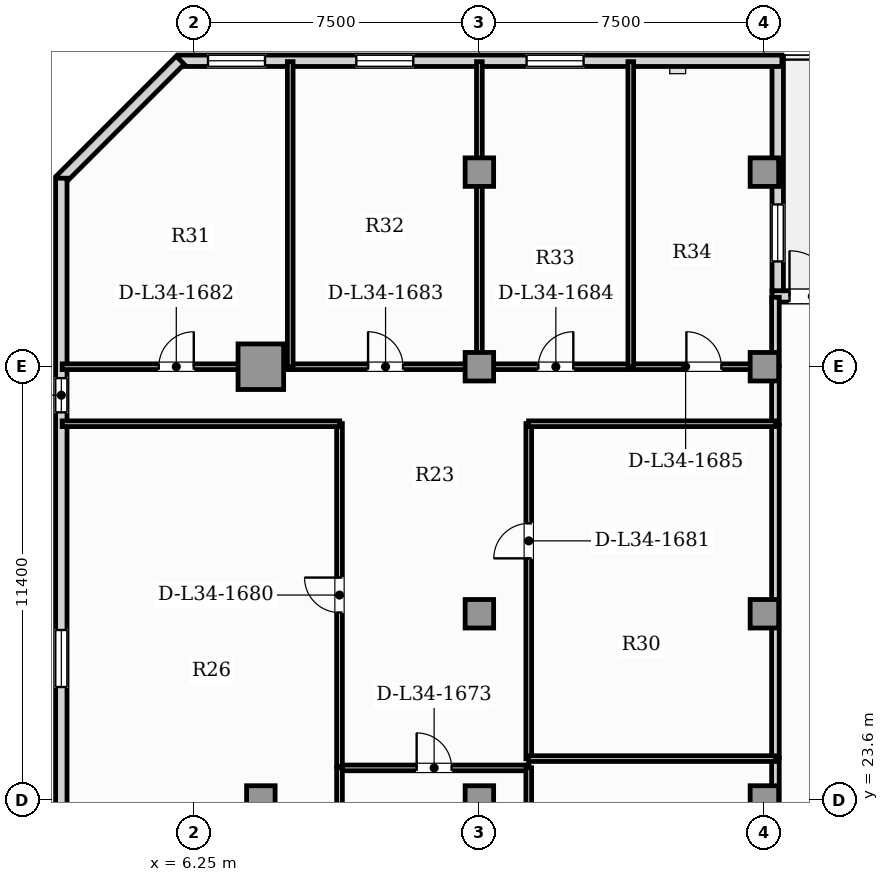
"""IFC4 building model, lengths in metres.
Left out: names, types, materials, properties, quantities, classifications, styles, units other than length and angle.
Written with IfcOpenShell. Run it as: python <this file> out.ifc"""

import sys

from ifc_helpers import new_model, si_unit, direction, frame, frame_2d, origin, origin_2d, place, context, subcontext, project, spatial, rectangle, hollow_rectangle, extrude, element, fill, save


model = new_model("IFC4")
c1 = context("Model", 3, precision=1e-05, world=origin(), true_north=direction((0.0, 1.0)))
c2 = subcontext(c1, "Body", "Model", "MODEL_VIEW")
j1 = project(units=[si_unit("LENGTHUNIT", "METRE"), si_unit("PLANEANGLEUNIT", "RADIAN")], contexts=[c1])
p1 = place(None, origin())
s1 = spatial("IfcSite", under=j1, at=p1, CompositionType="ELEMENT")
p2 = place(p1, origin())
s2 = spatial("IfcBuilding", under=s1, at=p2, CompositionType="ELEMENT")
p3 = place(p2, frame((0.0, 0.0, 140.15)))
s3 = spatial("IfcBuildingStorey", under=s2, at=p3, CompositionType="ELEMENT", Elevation=140.15)
p4 = place(p3, frame((8.0, 35.0, 0.0), z_axis=(0.0, 0.0, 1.0), x_axis=(1.0, 0.0, 0.0)))
e1 = element("IfcColumn", 1, at=p4, inside=s3, PredefinedType="USERDEFINED", context=c2, shape_type="SweptSolid", body=[
    extrude(hollow_rectangle(XDim=1.2, YDim=1.2, WallThickness=0.07, at=origin_2d()), origin(), (0.0, 0.0, 1.0), 5.05),
])
for number, where, z_axis, x_axis in (
    (2, (8.0, 23.6, 0.0), (0.0, 0.0, 1.0), (1.0, 0.0, 0.0)),
    (3, (13.75, 23.6, 0.0), (0.0, 0.0, 1.0), (1.0, 0.0, 0.0)),
    (4, (21.25, 23.6, 0.0), (0.0, 0.0, 1.0), (1.0, 0.0, 0.0)),
    (5, (13.75, 28.5, 0.0), (0.0, 0.0, 1.0), (1.0, 0.0, 0.0)),
    (6, (21.25, 28.5, 0.0), (0.0, 0.0, 1.0), (1.0, 0.0, 0.0)),
    (7, (13.75, 40.12, 0.0), (0.0, 0.0, 1.0), (1.0, 0.0, 0.0)),
    (8, (21.25, 40.12, 0.0), (0.0, 0.0, 1.0), (1.0, 0.0, 0.0)),
    (9, (13.75, 35.0, 0.0), (0.0, 0.0, 1.0), (1.0, 0.0, 0.0)),
    (10, (21.25, 35.0, 0.0), (0.0, 0.0, 1.0), (1.0, 0.0, 0.0)),
):
    element("IfcColumn", number, at=place(p3, frame(where, z_axis=z_axis, x_axis=x_axis)), inside=s3, PredefinedType="COLUMN", context=c2, shape_type="SweptSolid", body=[
        extrude(rectangle(XDim=0.75, YDim=0.75, at=origin_2d()), origin(), (0.0, 0.0, 1.0), 5.05),
    ])
p5 = place(p3, frame((21.45, 36.85, 0.0), z_axis=(0.0, 0.0, 1.0), x_axis=(1.0, 0.0, 0.0)))
e11 = element("IfcWall", 11, at=p5, inside=s3, PredefinedType="SOLIDWALL", context=c2, shape_type="SweptSolid", body=[
    extrude(rectangle(XDim=1.8, YDim=0.3, at=frame_2d((0.9, 0.0))), origin(), (0.0, 0.0, 1.0), 4.83),
])
p6 = place(p5, frame((0.46, 0.0, 0.0)))
e12 = element("IfcOpeningElement", 12, at=p6, cuts=e11, PredefinedType="OPENING", context=c2, shape_type="SweptSolid", body=[
    extrude(rectangle(XDim=1.2, YDim=2.2, at=frame_2d((0.6, 1.1))), frame((0.0, 0.16, 0.0), z_axis=(0.0, -1.0, 0.0), x_axis=(1.0, 0.0, 0.0)), (0.0, 0.0, 1.0), 0.32),
])
p7 = place(p3, frame((21.6, 37.0, 0.0), z_axis=(0.0, 0.0, 1.0), x_axis=(0.0, 1.0, 0.0)))
e13 = element("IfcWall", 13, at=p7, inside=s3, PredefinedType="SOLIDWALL", context=c2, shape_type="SweptSolid", body=[
    extrude(rectangle(XDim=6.16, YDim=0.3, at=frame_2d((3.08, 0.0))), origin(), (0.0, 0.0, 1.0), 4.83),
])
p8 = place(p7, frame((0.77, 0.0, 0.9)))
e14 = element("IfcOpeningElement", 14, at=p8, cuts=e13, PredefinedType="OPENING", context=c2, shape_type="SweptSolid", body=[
    extrude(rectangle(XDim=1.5, YDim=1.95, at=frame_2d((0.75, 0.975))), frame((0.0, 0.16, 0.0), z_axis=(0.0, -1.0, 0.0), x_axis=(1.0, 0.0, 0.0)), (0.0, 0.0, 1.0), 0.32),
])
p9 = place(p3, frame((21.71, 43.05, 0.0), z_axis=(0.0, 0.0, 1.0), x_axis=(-1.0, 0.0, 0.0)))
e15 = element("IfcWall", 15, at=p9, inside=s3, PredefinedType="SOLIDWALL", context=c2, shape_type="SweptSolid", body=[
    extrude(rectangle(XDim=15.87, YDim=0.3, at=frame_2d((7.935, 0.0))), origin(), (0.0, 0.0, 1.0), 4.83),
])
p10 = place(p9, frame((13.6, 0.0, 0.9)))
e16 = element("IfcOpeningElement", 16, at=p10, cuts=e15, PredefinedType="OPENING", context=c2, shape_type="SweptSolid", body=[
    extrude(rectangle(XDim=1.5, YDim=1.95, at=frame_2d((0.75, 0.975))), frame((0.0, 0.16, 0.0), z_axis=(0.0, -1.0, 0.0), x_axis=(1.0, 0.0, 0.0)), (0.0, 0.0, 1.0), 0.32),
])
p11 = place(p9, frame((9.699, 0.0, 0.9)))
e17 = element("IfcOpeningElement", 17, at=p11, cuts=e15, PredefinedType="OPENING", context=c2, shape_type="SweptSolid", body=[
    extrude(rectangle(XDim=1.5, YDim=1.95, at=frame_2d((0.75, 0.975))), frame((0.0, 0.16, 0.0), z_axis=(0.0, -1.0, 0.0), x_axis=(1.0, 0.0, 0.0)), (0.0, 0.0, 1.0), 0.32),
])
p12 = place(p9, frame((5.218, 0.0, 0.9)))
e18 = element("IfcOpeningElement", 18, at=p12, cuts=e15, PredefinedType="OPENING", context=c2, shape_type="SweptSolid", body=[
    extrude(rectangle(XDim=1.5, YDim=1.95, at=frame_2d((0.75, 0.975))), frame((0.0, 0.16, 0.0), z_axis=(0.0, -1.0, 0.0), x_axis=(1.0, 0.0, 0.0)), (0.0, 0.0, 1.0), 0.32),
])
p13 = place(p3, frame((5.878, 43.066, 0.0), z_axis=(0.0, 0.0, 1.0), x_axis=(-0.707079321262, -0.707134240044, 0.0)))
e19 = element("IfcWall", 19, at=p13, inside=s3, PredefinedType="SOLIDWALL", context=c2, shape_type="SweptSolid", body=[
    extrude(rectangle(XDim=4.446, YDim=0.3, at=frame_2d((2.223, 0.0))), origin(), (0.0, 0.0, 1.0), 4.83),
])
p14 = place(p3, frame((2.75, 39.96, 0.0), z_axis=(0.0, 0.0, 1.0), x_axis=(0.0, -1.0, 0.0)))
e20 = element("IfcWall", 20, at=p14, inside=s3, PredefinedType="SOLIDWALL", context=c2, shape_type="SweptSolid", body=[
    extrude(rectangle(XDim=36.72, YDim=0.3, at=frame_2d((18.36, 0.0))), origin(), (0.0, 0.0, 1.0), 4.83),
])
p15 = place(p14, frame((5.26, 0.0, 0.95)))
e21 = element("IfcOpeningElement", 21, at=p15, cuts=e20, PredefinedType="OPENING", context=c2, shape_type="SweptSolid", body=[
    extrude(rectangle(XDim=0.9, YDim=1.5, at=frame_2d((0.45, 0.75))), frame((0.0, 0.16, 0.0), z_axis=(0.0, -1.0, 0.0), x_axis=(1.0, 0.0, 0.0)), (0.0, 0.0, 1.0), 0.32),
])
p16 = place(p14, frame((21.287, 0.0, 0.9)))
e22 = element("IfcOpeningElement", 22, at=p16, cuts=e20, PredefinedType="OPENING", context=c2, shape_type="SweptSolid", body=[
    extrude(rectangle(XDim=1.5, YDim=1.95, at=frame_2d((0.75, 0.975))), frame((0.0, 0.16, 0.0), z_axis=(0.0, -1.0, 0.0), x_axis=(1.0, 0.0, 0.0)), (0.0, 0.0, 1.0), 0.32),
])
p17 = place(p14, frame((11.887, 0.0, 0.9)))
e23 = element("IfcOpeningElement", 23, at=p17, cuts=e20, PredefinedType="OPENING", context=c2, shape_type="SweptSolid", body=[
    extrude(rectangle(XDim=1.5, YDim=1.95, at=frame_2d((0.75, 0.975))), frame((0.0, 0.16, 0.0), z_axis=(0.0, -1.0, 0.0), x_axis=(1.0, 0.0, 0.0)), (0.0, 0.0, 1.0), 0.32),
])
p18 = place(p3, frame((21.54, 33.495, 0.0), z_axis=(0.0, 0.0, 1.0), x_axis=(0.0, 1.0, 0.0)))
e24 = element("IfcWall", 24, at=p18, inside=s3, PredefinedType="PARTITIONING", context=c2, shape_type="SweptSolid", body=[
    extrude(rectangle(XDim=1.51, YDim=0.2, at=frame_2d((0.755, 0.0))), origin(), (0.0, 0.0, 1.0), 4.83),
])
p19 = place(p3, frame((21.54, 18.633, 0.0), z_axis=(0.0, 0.0, 1.0), x_axis=(0.0, 1.0, 0.0)))
e25 = element("IfcWall", 25, at=p19, inside=s3, PredefinedType="PARTITIONING", context=c2, shape_type="SweptSolid", body=[
    extrude(rectangle(XDim=6.061, YDim=0.2, at=frame_2d((3.03, 0.0))), origin(), (0.0, 0.0, 1.0), 4.83),
])
p20 = place(p3, frame((21.54, 24.724, 0.0), z_axis=(0.0, 0.0, 1.0), x_axis=(0.0, 1.0, 0.0)))
e26 = element("IfcWall", 26, at=p20, inside=s3, PredefinedType="PARTITIONING", context=c2, shape_type="SweptSolid", body=[
    extrude(rectangle(XDim=8.741, YDim=0.2, at=frame_2d((4.371, 0.0))), origin(), (0.0, 0.0, 1.0), 4.83),
])
p21 = place(p3, frame((21.54, 35.035, 0.0), z_axis=(0.0, 0.0, 1.0), x_axis=(0.0, 1.0, 0.0)))
e27 = element("IfcWall", 27, at=p21, inside=s3, PredefinedType="PARTITIONING", context=c2, shape_type="SweptSolid", body=[
    extrude(rectangle(XDim=1.792, YDim=0.2, at=frame_2d((0.896, 0.0))), origin(), (0.0, 0.0, 1.0), 4.83),
])
p22 = place(p3, frame((10.065, 24.444, 0.0), z_axis=(0.0, 0.0, 1.0), x_axis=(1.0, 0.0, 0.0)))
e28 = element("IfcWall", 28, at=p22, inside=s3, PredefinedType="PARTITIONING", context=c2, shape_type="SweptSolid", body=[
    extrude(rectangle(XDim=4.99, YDim=0.15, at=frame_2d((2.495, 0.0))), origin(), (0.0, 0.0, 1.0), 4.83),
])
p23 = place(p22, frame((2.035, 0.0, 0.0)))
e29 = element("IfcOpeningElement", 29, at=p23, cuts=e28, PredefinedType="OPENING", context=c2, shape_type="SweptSolid", body=[
    extrude(rectangle(XDim=0.92, YDim=2.1, at=frame_2d((0.46, 1.05))), frame((0.0, 0.085, 0.0), z_axis=(0.0, -1.0, 0.0), x_axis=(1.0, 0.0, 0.0)), (0.0, 0.0, 1.0), 0.17),
])
p24 = place(p3, frame((10.07, 21.18, 0.0), z_axis=(0.0, 0.0, 1.0), x_axis=(0.0, 1.0, 0.0)))
e30 = element("IfcWall", 30, at=p24, inside=s3, PredefinedType="PARTITIONING", context=c2, shape_type="SweptSolid", body=[
    extrude(rectangle(XDim=3.269, YDim=0.15, at=frame_2d((1.634, 0.0))), origin(), (0.0, 0.0, 1.0), 4.377),
])
p25 = place(p24, frame((1.174, 0.0, 0.0)))
e31 = element("IfcOpeningElement", 31, at=p25, cuts=e30, PredefinedType="OPENING", context=c2, shape_type="SweptSolid", body=[
    extrude(rectangle(XDim=0.92, YDim=2.1, at=frame_2d((0.46, 1.05))), frame((0.0, 0.085, 0.0), z_axis=(0.0, -1.0, 0.0), x_axis=(1.0, 0.0, 0.0)), (0.0, 0.0, 1.0), 0.17),
])
p26 = place(p3, frame((15.05, 18.633, 0.0), z_axis=(0.0, 0.0, 1.0), x_axis=(0.0, 1.0, 0.0)))
e32 = element("IfcWall", 32, at=p26, inside=s3, PredefinedType="PARTITIONING", context=c2, shape_type="SweptSolid", body=[
    extrude(rectangle(XDim=5.816, YDim=0.15, at=frame_2d((2.908, 0.0))), origin(), (0.0, 0.0, 1.0), 4.83),
])
p27 = place(p26, frame((2.448, 0.0, 0.0)))
e33 = element("IfcOpeningElement", 33, at=p27, cuts=e32, PredefinedType="OPENING", context=c2, shape_type="SweptSolid", body=[
    extrude(rectangle(XDim=0.92, YDim=2.1, at=frame_2d((0.46, 1.05))), frame((0.0, 0.085, 0.0), z_axis=(0.0, -1.0, 0.0), x_axis=(1.0, 0.0, 0.0)), (0.0, 0.0, 1.0), 0.17),
])
p28 = place(p3, frame((10.07, 24.479, 0.0), z_axis=(0.0, 0.0, 1.0), x_axis=(0.0, 1.0, 0.0)))
e34 = element("IfcWall", 34, at=p28, inside=s3, PredefinedType="PARTITIONING", context=c2, shape_type="SweptSolid", body=[
    extrude(rectangle(XDim=9.026, YDim=0.15, at=frame_2d((4.513, 0.0))), origin(), (0.0, 0.0, 1.0), 4.377),
])
p29 = place(p28, frame((4.053, 0.0, 0.0)))
e35 = element("IfcOpeningElement", 35, at=p29, cuts=e34, PredefinedType="OPENING", context=c2, shape_type="SweptSolid", body=[
    extrude(rectangle(XDim=0.92, YDim=2.1, at=frame_2d((0.46, 1.05))), frame((0.0, 0.085, 0.0), z_axis=(0.0, -1.0, 0.0), x_axis=(1.0, 0.0, 0.0)), (0.0, 0.0, 1.0), 0.17),
])
p30 = place(p3, frame((2.772, 33.5, 0.0), z_axis=(0.0, 0.0, 1.0), x_axis=(1.0, 0.0, 0.0)))
e36 = element("IfcWall", 36, at=p30, inside=s3, PredefinedType="PARTITIONING", context=c2, shape_type="SweptSolid", body=[
    extrude(rectangle(XDim=7.302, YDim=0.15, at=frame_2d((3.651, 0.0))), origin(), (0.0, 0.0, 1.0), 4.83),
])
p31 = place(p3, frame((15.05, 24.684, 0.0), z_axis=(0.0, 0.0, 1.0), x_axis=(0.0, 1.0, 0.0)))
e37 = element("IfcWall", 37, at=p31, inside=s3, PredefinedType="PARTITIONING", context=c2, shape_type="SweptSolid", body=[
    extrude(rectangle(XDim=8.821, YDim=0.15, at=frame_2d((4.411, 0.0))), origin(), (0.0, 0.0, 1.0), 4.83),
])
p32 = place(p31, frame((5.274, 0.0, 0.0)))
e38 = element("IfcOpeningElement", 38, at=p32, cuts=e37, PredefinedType="OPENING", context=c2, shape_type="SweptSolid", body=[
    extrude(rectangle(XDim=0.92, YDim=2.1, at=frame_2d((0.46, 1.05))), frame((0.0, 0.085, 0.0), z_axis=(0.0, -1.0, 0.0), x_axis=(1.0, 0.0, 0.0)), (0.0, 0.0, 1.0), 0.17),
])
p33 = place(p3, frame((15.045, 33.5, 0.0), z_axis=(0.0, 0.0, 1.0), x_axis=(1.0, 0.0, 0.0)))
e39 = element("IfcWall", 39, at=p33, inside=s3, PredefinedType="PARTITIONING", context=c2, shape_type="SweptSolid", body=[
    extrude(rectangle(XDim=6.5, YDim=0.15, at=frame_2d((3.25, 0.0))), origin(), (0.0, 0.0, 1.0), 4.83),
])
p34 = place(p3, frame((2.772, 35.0, 0.0), z_axis=(0.0, 0.0, 1.0), x_axis=(1.0, 0.0, 0.0)))
e40 = element("IfcWall", 40, at=p34, inside=s3, PredefinedType="PARTITIONING", context=c2, shape_type="SweptSolid", body=[
    extrude(rectangle(XDim=6.005, YDim=0.15, at=frame_2d((3.002, 0.0))), origin(), (0.0, 0.0, 1.0), 4.213),
])
p35 = place(p34, frame((2.542, 0.0, 0.0)))
e41 = element("IfcOpeningElement", 41, at=p35, cuts=e40, PredefinedType="OPENING", context=c2, shape_type="SweptSolid", body=[
    extrude(rectangle(XDim=0.92, YDim=2.1, at=frame_2d((0.46, 1.05))), frame((0.0, 0.085, 0.0), z_axis=(0.0, -1.0, 0.0), x_axis=(1.0, 0.0, 0.0)), (0.0, 0.0, 1.0), 0.17),
])
p36 = place(p3, frame((8.808, 35.0, 0.0), z_axis=(0.0, 0.0, 1.0), x_axis=(1.0, 0.0, 0.0)))
e42 = element("IfcWall", 42, at=p36, inside=s3, PredefinedType="PARTITIONING", context=c2, shape_type="SweptSolid", body=[
    extrude(rectangle(XDim=4.947, YDim=0.15, at=frame_2d((2.474, 0.0))), origin(), (0.0, 0.0, 1.0), 4.213),
])
p37 = place(p36, frame((2.014, 0.0, 0.0)))
e43 = element("IfcOpeningElement", 43, at=p37, cuts=e42, PredefinedType="OPENING", context=c2, shape_type="SweptSolid", body=[
    extrude(rectangle(XDim=0.92, YDim=2.1, at=frame_2d((0.46, 1.05))), frame((0.0, 0.085, 0.0), z_axis=(0.0, -1.0, 0.0), x_axis=(1.0, 0.0, 0.0)), (0.0, 0.0, 1.0), 0.17),
])
p38 = place(p3, frame((13.785, 35.0, 0.0), z_axis=(0.0, 0.0, 1.0), x_axis=(1.0, 0.0, 0.0)))
e44 = element("IfcWall", 44, at=p38, inside=s3, PredefinedType="PARTITIONING", context=c2, shape_type="SweptSolid", body=[
    extrude(rectangle(XDim=3.954, YDim=0.15, at=frame_2d((1.977, 0.0))), origin(), (0.0, 0.0, 1.0), 4.213),
])
p39 = place(p38, frame((1.517, 0.0, 0.0)))
e45 = element("IfcOpeningElement", 45, at=p39, cuts=e44, PredefinedType="OPENING", context=c2, shape_type="SweptSolid", body=[
    extrude(rectangle(XDim=0.92, YDim=2.1, at=frame_2d((0.46, 1.05))), frame((0.0, 0.085, 0.0), z_axis=(0.0, -1.0, 0.0), x_axis=(1.0, 0.0, 0.0)), (0.0, 0.0, 1.0), 0.17),
])
p40 = place(p3, frame((17.769, 35.0, 0.0), z_axis=(0.0, 0.0, 1.0), x_axis=(1.0, 0.0, 0.0)))
e46 = element("IfcWall", 46, at=p40, inside=s3, PredefinedType="PARTITIONING", context=c2, shape_type="SweptSolid", body=[
    extrude(rectangle(XDim=3.776, YDim=0.15, at=frame_2d((1.888, 0.0))), origin(), (0.0, 0.0, 1.0), 4.213),
])
p41 = place(p40, frame((1.428, 0.0, 0.0)))
e47 = element("IfcOpeningElement", 47, at=p41, cuts=e46, PredefinedType="OPENING", context=c2, shape_type="SweptSolid", body=[
    extrude(rectangle(XDim=0.92, YDim=2.1, at=frame_2d((0.46, 1.05))), frame((0.0, 0.085, 0.0), z_axis=(0.0, -1.0, 0.0), x_axis=(1.0, 0.0, 0.0)), (0.0, 0.0, 1.0), 0.17),
])
p42 = place(p3, frame((15.045, 24.689, 0.0), z_axis=(0.0, 0.0, 1.0), x_axis=(1.0, 0.0, 0.0)))
e48 = element("IfcWall", 48, at=p42, inside=s3, PredefinedType="PARTITIONING", context=c2, shape_type="SweptSolid", body=[
    extrude(rectangle(XDim=6.5, YDim=0.15, at=frame_2d((3.25, 0.0))), origin(), (0.0, 0.0, 1.0), 4.83),
])
for number, where, z_axis, x_axis in (
    (49, (8.773, 34.995, 0.0), (0.0, 0.0, 1.0), (0.0, 1.0, 0.0)),
    (50, (13.75, 34.995, 0.0), (0.0, 0.0, 1.0), (0.0, 1.0, 0.0)),
    (51, (17.734, 34.995, 0.0), (0.0, 0.0, 1.0), (0.0, 1.0, 0.0)),
):
    element("IfcWall", number, at=place(p3, frame(where, z_axis=z_axis, x_axis=x_axis)), inside=s3, PredefinedType="PARTITIONING", context=c2, shape_type="SweptSolid", body=[
        extrude(rectangle(XDim=8.032, YDim=0.15, at=frame_2d((4.016, 0.0))), origin(), (0.0, 0.0, 1.0), 4.83),
    ])
p43 = place(p6, origin())
e52 = element("IfcDoor", 52, at=p43, inside=s3, OperationType="SINGLE_SWING_LEFT", PredefinedType="DOOR", context=c2, shape_type="SweptSolid", body=[
    extrude(rectangle(XDim=1.2, YDim=2.2, at=frame_2d((0.6, 1.1))), frame((0.0, 0.025, 0.0), z_axis=(0.0, -1.0, 0.0), x_axis=(1.0, 0.0, 0.0)), (0.0, 0.0, 1.0), 0.05),
])
fill(e12, e52)
p44 = place(p15, origin())
e53 = element("IfcWindow", 53, at=p44, inside=s3, PartitioningType="SINGLE_PANEL", PredefinedType="WINDOW", context=c2, shape_type="SweptSolid", body=[
    extrude(rectangle(XDim=0.9, YDim=1.5, at=frame_2d((0.45, 0.75))), frame((0.0, 0.03, 0.0), z_axis=(0.0, -1.0, 0.0), x_axis=(1.0, 0.0, 0.0)), (0.0, 0.0, 1.0), 0.06),
])
fill(e21, e53)
p45 = place(p17, origin())
e54 = element("IfcWindow", 54, at=p45, inside=s3, PartitioningType="SINGLE_PANEL", PredefinedType="WINDOW", context=c2, shape_type="SweptSolid", body=[
    extrude(rectangle(XDim=1.5, YDim=1.95, at=frame_2d((0.75, 0.975))), frame((0.0, 0.03, 0.0), z_axis=(0.0, -1.0, 0.0), x_axis=(1.0, 0.0, 0.0)), (0.0, 0.0, 1.0), 0.06),
])
fill(e23, e54)
p46 = place(p10, origin())
e55 = element("IfcWindow", 55, at=p46, inside=s3, PartitioningType="SINGLE_PANEL", PredefinedType="WINDOW", context=c2, shape_type="SweptSolid", body=[
    extrude(rectangle(XDim=1.5, YDim=1.95, at=frame_2d((0.75, 0.975))), frame((0.0, 0.03, 0.0), z_axis=(0.0, -1.0, 0.0), x_axis=(1.0, 0.0, 0.0)), (0.0, 0.0, 1.0), 0.06),
])
fill(e16, e55)
p47 = place(p11, origin())
e56 = element("IfcWindow", 56, at=p47, inside=s3, PartitioningType="SINGLE_PANEL", PredefinedType="WINDOW", context=c2, shape_type="SweptSolid", body=[
    extrude(rectangle(XDim=1.5, YDim=1.95, at=frame_2d((0.75, 0.975))), frame((0.0, 0.03, 0.0), z_axis=(0.0, -1.0, 0.0), x_axis=(1.0, 0.0, 0.0)), (0.0, 0.0, 1.0), 0.06),
])
fill(e17, e56)
p48 = place(p12, origin())
e57 = element("IfcWindow", 57, at=p48, inside=s3, PartitioningType="SINGLE_PANEL", PredefinedType="WINDOW", context=c2, shape_type="SweptSolid", body=[
    extrude(rectangle(XDim=1.5, YDim=1.95, at=frame_2d((0.75, 0.975))), frame((0.0, 0.03, 0.0), z_axis=(0.0, -1.0, 0.0), x_axis=(1.0, 0.0, 0.0)), (0.0, 0.0, 1.0), 0.06),
])
fill(e18, e57)
p49 = place(p8, origin())
e58 = element("IfcWindow", 58, at=p49, inside=s3, PartitioningType="SINGLE_PANEL", PredefinedType="WINDOW", context=c2, shape_type="SweptSolid", body=[
    extrude(rectangle(XDim=1.5, YDim=1.95, at=frame_2d((0.75, 0.975))), frame((0.0, 0.03, 0.0), z_axis=(0.0, -1.0, 0.0), x_axis=(1.0, 0.0, 0.0)), (0.0, 0.0, 1.0), 0.06),
])
fill(e14, e58)
p50 = place(p23, origin())
e59 = element("IfcDoor", 59, at=p50, inside=s3, OperationType="SINGLE_SWING_LEFT", PredefinedType="DOOR", context=c2, shape_type="SweptSolid", body=[
    extrude(rectangle(XDim=0.92, YDim=2.1, at=frame_2d((0.46, 1.05))), frame((0.0, 0.025, 0.0), z_axis=(0.0, -1.0, 0.0), x_axis=(1.0, 0.0, 0.0)), (0.0, 0.0, 1.0), 0.05),
])
fill(e29, e59)
p51 = place(p29, origin())
e60 = element("IfcDoor", 60, at=p51, inside=s3, OperationType="SINGLE_SWING_RIGHT", PredefinedType="DOOR", context=c2, shape_type="SweptSolid", body=[
    extrude(rectangle(XDim=0.92, YDim=2.1, at=frame_2d((0.46, 1.05))), frame((0.0, 0.025, 0.0), z_axis=(0.0, -1.0, 0.0), x_axis=(1.0, 0.0, 0.0)), (0.0, 0.0, 1.0), 0.05),
])
fill(e35, e60)
p52 = place(p32, origin())
e61 = element("IfcDoor", 61, at=p52, inside=s3, OperationType="SINGLE_SWING_LEFT", PredefinedType="DOOR", context=c2, shape_type="SweptSolid", body=[
    extrude(rectangle(XDim=0.92, YDim=2.1, at=frame_2d((0.46, 1.05))), frame((0.0, 0.025, 0.0), z_axis=(0.0, -1.0, 0.0), x_axis=(1.0, 0.0, 0.0)), (0.0, 0.0, 1.0), 0.05),
])
fill(e38, e61)
p53 = place(p35, origin())
e62 = element("IfcDoor", 62, at=p53, inside=s3, OperationType="SINGLE_SWING_RIGHT", PredefinedType="DOOR", context=c2, shape_type="SweptSolid", body=[
    extrude(rectangle(XDim=0.92, YDim=2.1, at=frame_2d((0.46, 1.05))), frame((0.0, 0.025, 0.0), z_axis=(0.0, -1.0, 0.0), x_axis=(1.0, 0.0, 0.0)), (0.0, 0.0, 1.0), 0.05),
])
fill(e41, e62)
p54 = place(p37, origin())
e63 = element("IfcDoor", 63, at=p54, inside=s3, OperationType="SINGLE_SWING_LEFT", PredefinedType="DOOR", context=c2, shape_type="SweptSolid", body=[
    extrude(rectangle(XDim=0.92, YDim=2.1, at=frame_2d((0.46, 1.05))), frame((0.0, 0.025, 0.0), z_axis=(0.0, -1.0, 0.0), x_axis=(1.0, 0.0, 0.0)), (0.0, 0.0, 1.0), 0.05),
])
fill(e43, e63)
p55 = place(p39, origin())
e64 = element("IfcDoor", 64, at=p55, inside=s3, OperationType="SINGLE_SWING_RIGHT", PredefinedType="DOOR", context=c2, shape_type="SweptSolid", body=[
    extrude(rectangle(XDim=0.92, YDim=2.1, at=frame_2d((0.46, 1.05))), frame((0.0, 0.025, 0.0), z_axis=(0.0, -1.0, 0.0), x_axis=(1.0, 0.0, 0.0)), (0.0, 0.0, 1.0), 0.05),
])
fill(e45, e64)
p56 = place(p41, origin())
e65 = element("IfcDoor", 65, at=p56, inside=s3, OperationType="SINGLE_SWING_LEFT", PredefinedType="DOOR", context=c2, shape_type="SweptSolid", body=[
    extrude(rectangle(XDim=0.92, YDim=2.1, at=frame_2d((0.46, 1.05))), frame((0.0, 0.025, 0.0), z_axis=(0.0, -1.0, 0.0), x_axis=(1.0, 0.0, 0.0)), (0.0, 0.0, 1.0), 0.05),
])
fill(e47, e65)
save(model, sys.argv[1])
